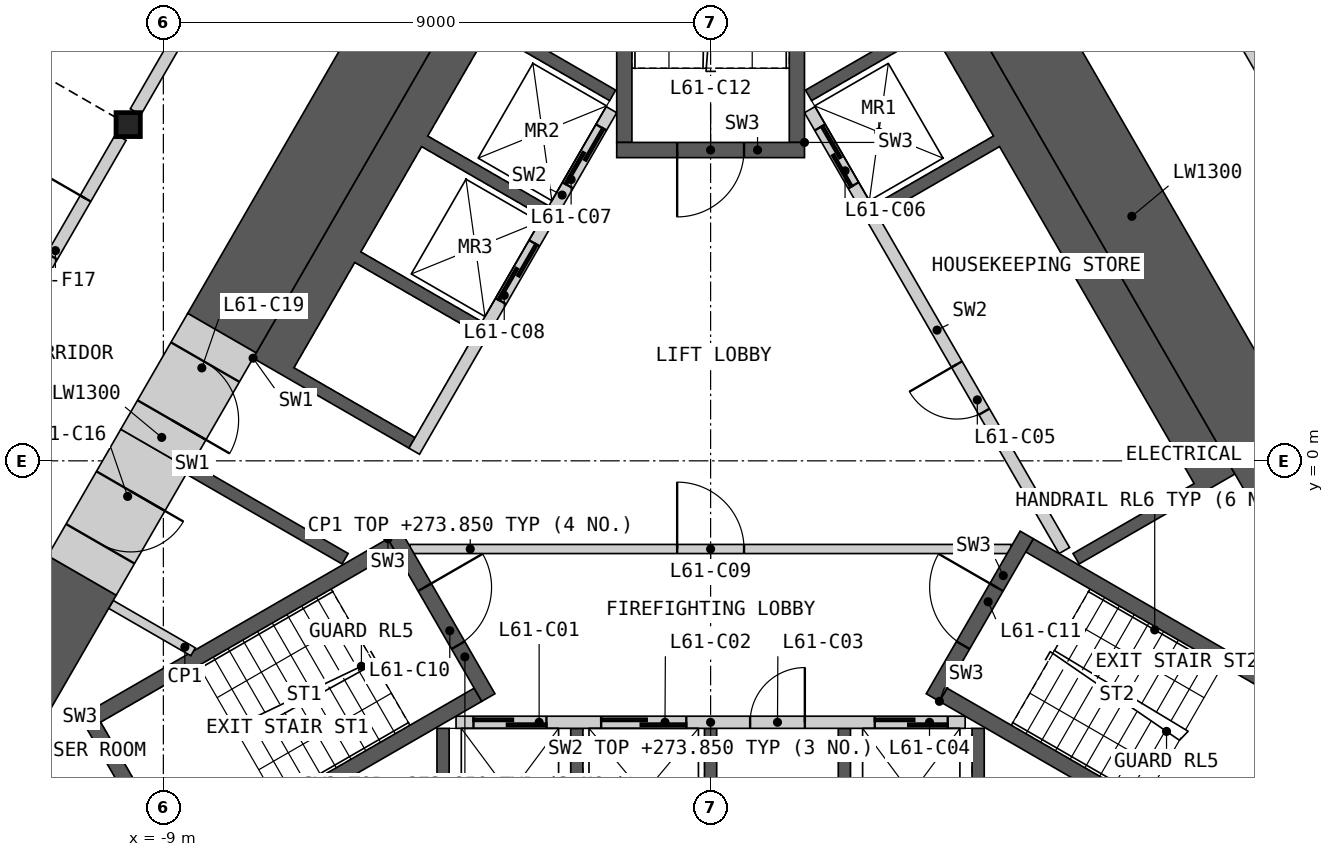
"""IFC4 building model, lengths in metres.
Left out: names, types, materials, properties, quantities, classifications, styles, units other than length and angle.
Written with IfcOpenShell. Run it as: python <this file> out.ifc"""

import sys

from ifc_helpers import new_model, si_unit, direction, frame, frame_2d, origin, origin_2d, place, context, subcontext, project, spatial, polyline, rectangle, i_section, outline, extrude, element, fill, save


model = new_model("IFC4")
c1 = context("Model", 3, precision=1e-05, world=origin(), true_north=direction((0.0, 1.0)))
c2 = subcontext(c1, "Body", "Model", "MODEL_VIEW")
j1 = project(units=[si_unit("LENGTHUNIT", "METRE"), si_unit("PLANEANGLEUNIT", "RADIAN")], contexts=[c1])
p1 = place(None, origin())
s1 = spatial("IfcSite", under=j1, at=p1, CompositionType="ELEMENT")
p2 = place(p1, origin())
s2 = spatial("IfcBuilding", under=s1, at=p2, CompositionType="ELEMENT")
p3 = place(p2, frame((0.0, 0.0, 270.6)))
s3 = spatial("IfcBuildingStorey", under=s2, at=p3, CompositionType="ELEMENT", Elevation=270.6)
p4 = place(p3, frame((-9.578, 5.53, 0.0), z_axis=(0.0, 0.0, 1.0), x_axis=(1.0, 0.0, 0.0)))
e1 = element("IfcColumn", 1, at=p4, inside=s3, PredefinedType="COLUMN", context=c2, shape_type="SweptSolid", body=[
    extrude(i_section(OverallWidth=0.399, OverallDepth=0.393, WebThickness=0.023, FlangeThickness=0.037, at=origin_2d()), origin(), (0.0, 0.0, 1.0), 3.6),
])
p5 = place(p3, origin())
e2 = element("IfcWall", 2, at=p5, inside=s3, PredefinedType="SHEAR", context=c2, shape_type="SweptSolid", body=[
    extrude(outline(polyline([(0.1, -7.36), (-4.5, -7.36), (-4.5, -4.4), (-4.3, -4.4), (-4.3, -6.7), (-2.3, -6.7), (-2.3, -4.4), (-2.1, -4.4), (-2.1, -6.7), (-0.1, -6.7), (-0.1, -4.4), (0.1, -4.4), (0.1, -7.36)])), origin(), (0.0, 0.0, 1.0), 3.25),
])
p6 = place(p3, origin())
e3 = element("IfcWall", 3, at=p6, inside=s3, PredefinedType="SHEAR", context=c2, shape_type="SweptSolid", body=[
    extrude(outline(polyline([(2.1, -7.36), (2.1, -4.4), (2.3, -4.4), (2.3, -6.7), (4.3, -6.7), (4.3, -4.4), (4.5, -4.4), (4.5, -7.36), (2.1, -7.36)])), origin(), (0.0, 0.0, 1.0), 3.25),
])
p7 = place(p3, frame((-4.187, -4.3, 0.0), z_axis=(0.0, 0.0, 1.0), x_axis=(1.0, 0.0, 0.0)))
e4 = element("IfcWall", 4, at=p7, inside=s3, PredefinedType="SOLIDWALL", context=c2, shape_type="SweptSolid", body=[
    extrude(rectangle(XDim=8.373, YDim=0.2, at=frame_2d((4.187, 0.0))), origin(), (0.0, 0.0, 1.0), 3.25),
])
p8 = place(p7, frame((0.287, 0.0, 0.0)))
e5 = element("IfcOpeningElement", 5, at=p8, cuts=e4, PredefinedType="OPENING", context=c2, shape_type="SweptSolid", body=[
    extrude(rectangle(XDim=1.2, YDim=2.1, at=frame_2d((0.6, 1.05))), frame((0.0, 0.11, 0.0), z_axis=(0.0, -1.0, 0.0), x_axis=(1.0, 0.0, 0.0)), (0.0, 0.0, 1.0), 0.22),
])
p9 = place(p7, frame((2.387, 0.0, 0.0)))
e6 = element("IfcOpeningElement", 6, at=p9, cuts=e4, PredefinedType="OPENING", context=c2, shape_type="SweptSolid", body=[
    extrude(rectangle(XDim=1.4, YDim=2.1, at=frame_2d((0.7, 1.05))), frame((0.0, 0.11, 0.0), z_axis=(0.0, -1.0, 0.0), x_axis=(1.0, 0.0, 0.0)), (0.0, 0.0, 1.0), 0.22),
])
p10 = place(p7, frame((4.837, 0.0, 0.0)))
e7 = element("IfcOpeningElement", 7, at=p10, cuts=e4, PredefinedType="OPENING", context=c2, shape_type="SweptSolid", body=[
    extrude(rectangle(XDim=0.9, YDim=2.1, at=frame_2d((0.45, 1.05))), frame((0.0, 0.11, 0.0), z_axis=(0.0, -1.0, 0.0), x_axis=(1.0, 0.0, 0.0)), (0.0, 0.0, 1.0), 0.22),
])
p11 = place(p7, frame((6.887, 0.0, 0.0)))
e8 = element("IfcOpeningElement", 8, at=p11, cuts=e4, PredefinedType="OPENING", context=c2, shape_type="SweptSolid", body=[
    extrude(rectangle(XDim=1.2, YDim=2.1, at=frame_2d((0.6, 1.05))), frame((0.0, 0.11, 0.0), z_axis=(0.0, -1.0, 0.0), x_axis=(1.0, 0.0, 0.0)), (0.0, 0.0, 1.0), 0.22),
])
p12 = place(p3, origin())
e9 = element("IfcWall", 9, at=p12, inside=s3, PredefinedType="SHEAR", context=c2, shape_type="SweptSolid", body=[
    extrude(outline(polyline([(4.124, 7.577), (8.624, -0.217), (8.231, -0.444), (6.061, -1.697), (5.96, -1.524), (7.952, -0.374), (4.752, 5.169), (2.76, 4.019), (2.66, 4.192), (4.652, 5.342), (3.652, 7.074), (1.66, 5.924), (1.561, 6.097), (3.731, 7.35), (4.124, 7.577)])), origin(), (0.0, 0.0, 1.0), 3.25),
])
p13 = place(p3, frame((5.817, -1.476, 0.0), z_axis=(0.0, 0.0, 1.0), x_axis=(-0.500002616675, 0.866023893041, 0.0)))
e10 = element("IfcWall", 10, at=p13, inside=s3, PredefinedType="SOLIDWALL", context=c2, shape_type="SweptSolid", body=[
    extrude(rectangle(XDim=8.373, YDim=0.2, at=frame_2d((4.187, 0.0))), origin(), (0.0, 0.0, 1.0), 3.25),
])
p14 = place(p13, frame((2.637, 0.0, 0.0)))
e11 = element("IfcOpeningElement", 11, at=p14, cuts=e10, PredefinedType="OPENING", context=c2, shape_type="SweptSolid", body=[
    extrude(rectangle(XDim=0.9, YDim=2.1, at=frame_2d((0.45, 1.05))), frame((0.0, 0.11, 0.0), z_axis=(0.0, -1.0, 0.0), x_axis=(1.0, 0.0, 0.0)), (0.0, 0.0, 1.0), 0.22),
])
p15 = place(p13, frame((6.937, 0.0, 0.0)))
e12 = element("IfcOpeningElement", 12, at=p15, cuts=e10, PredefinedType="OPENING", context=c2, shape_type="SweptSolid", body=[
    extrude(rectangle(XDim=1.1, YDim=2.1, at=frame_2d((0.55, 1.05))), frame((0.0, 0.11, 0.0), z_axis=(0.0, -1.0, 0.0), x_axis=(1.0, 0.0, 0.0)), (0.0, 0.0, 1.0), 0.22),
])
p16 = place(p3, origin())
e13 = element("IfcWall", 13, at=p16, inside=s3, PredefinedType="SHEAR", context=c2, shape_type="SweptSolid", body=[
    extrude(outline(polyline([(-7.524, 1.688), (-4.124, 7.577), (-3.731, 7.35), (-1.561, 6.097), (-1.66, 5.924), (-3.652, 7.074), (-4.652, 5.342), (-2.66, 4.192), (-2.76, 4.019), (-4.752, 5.169), (-5.752, 3.437), (-3.76, 2.287), (-3.861, 2.113), (-5.852, 3.263), (-6.852, 1.531), (-4.861, 0.381), (-4.96, 0.208), (-7.131, 1.461), (-7.524, 1.688)])), origin(), (0.0, 0.0, 1.0), 3.25),
])
p17 = place(p3, origin())
e14 = element("IfcWall", 14, at=p17, inside=s3, PredefinedType="SHEAR", context=c2, shape_type="SweptSolid", body=[
    extrude(outline(polyline([(-8.524, -0.044), (-8.131, -0.271), (-5.96, -1.524), (-6.061, -1.697), (-8.231, -0.444), (-8.624, -0.217), (-8.524, -0.044)])), origin(), (0.0, 0.0, 1.0), 3.25),
])
p18 = place(p3, frame((-1.631, 5.776, 0.0), z_axis=(0.0, 0.0, 1.0), x_axis=(-0.499992876559, -0.866029516466, 0.0)))
e15 = element("IfcWall", 15, at=p18, inside=s3, PredefinedType="SOLIDWALL", context=c2, shape_type="SweptSolid", body=[
    extrude(rectangle(XDim=6.486, YDim=0.2, at=frame_2d((3.243, 0.0))), origin(), (0.0, 0.0, 1.0), 3.25),
])
p19 = place(p18, frame((0.337, 0.0, 0.0)))
e16 = element("IfcOpeningElement", 16, at=p19, cuts=e15, PredefinedType="OPENING", context=c2, shape_type="SweptSolid", body=[
    extrude(rectangle(XDim=1.1, YDim=2.1, at=frame_2d((0.55, 1.05))), frame((0.0, 0.11, 0.0), z_axis=(0.0, -1.0, 0.0), x_axis=(1.0, 0.0, 0.0)), (0.0, 0.0, 1.0), 0.22),
])
p20 = place(p18, frame((2.537, 0.0, 0.0)))
e17 = element("IfcOpeningElement", 17, at=p20, cuts=e15, PredefinedType="OPENING", context=c2, shape_type="SweptSolid", body=[
    extrude(rectangle(XDim=1.1, YDim=2.1, at=frame_2d((0.55, 1.05))), frame((0.0, 0.11, 0.0), z_axis=(0.0, -1.0, 0.0), x_axis=(1.0, 0.0, 0.0)), (0.0, 0.0, 1.0), 0.22),
])
p21 = place(p3, frame((-4.941, -1.45, 0.0), z_axis=(0.0, 0.0, 1.0), x_axis=(1.0, 0.0, 0.0)))
e18 = element("IfcWall", 18, at=p21, inside=s3, PredefinedType="PARTITIONING", context=c2, shape_type="SweptSolid", body=[
    extrude(rectangle(XDim=9.882, YDim=0.15, at=frame_2d((4.941, 0.0))), origin(), (0.0, 0.0, 1.0), 3.25),
])
p22 = place(p21, frame((4.391, 0.0, 0.0)))
e19 = element("IfcOpeningElement", 19, at=p22, cuts=e18, PredefinedType="OPENING", context=c2, shape_type="SweptSolid", body=[
    extrude(rectangle(XDim=1.1, YDim=2.1, at=frame_2d((0.55, 1.05))), frame((0.0, 0.085, 0.0), z_axis=(0.0, -1.0, 0.0), x_axis=(1.0, 0.0, 0.0)), (0.0, 0.0, 1.0), 0.17),
])
p23 = place(p3, origin())
e20 = element("IfcWall", 20, at=p23, inside=s3, PredefinedType="SHEAR", context=c2, shape_type="SweptSolid", body=[
    extrude(outline(polyline([(-5.307, -1.281), (-10.374, -4.206), (-10.032, -4.298), (-5.182, -1.498), (-5.307, -1.281)])), origin(), (0.0, 0.0, 1.0), 3.25),
])
p24 = place(p3, origin())
e21 = element("IfcWall", 21, at=p24, inside=s3, PredefinedType="SHEAR", context=c2, shape_type="SweptSolid", body=[
    extrude(outline(polyline([(-10.374, -4.206), (-8.83, -6.881), (-8.738, -6.539), (-10.032, -4.298), (-10.374, -4.206)])), origin(), (0.0, 0.0, 1.0), 3.25),
])
p25 = place(p3, origin())
e22 = element("IfcWall", 22, at=p25, inside=s3, PredefinedType="SHEAR", context=c2, shape_type="SweptSolid", body=[
    extrude(outline(polyline([(-8.738, -6.539), (-8.83, -6.881), (-3.763, -3.956), (-3.888, -3.739), (-8.738, -6.539)])), origin(), (0.0, 0.0, 1.0), 3.25),
])
p26 = place(p3, frame((-5.199, -1.219, 0.0), z_axis=(0.0, 0.0, 1.0), x_axis=(0.499982516597, -0.866035497597, 0.0)))
e23 = element("IfcWall", 23, at=p26, inside=s3, PredefinedType="SHEAR", context=c2, shape_type="SweptSolid", body=[
    extrude(rectangle(XDim=3.088, YDim=0.25, at=frame_2d((1.544, 0.0))), origin(), (0.0, 0.0, 1.0), 3.25),
])
p27 = place(p26, frame((0.994, 0.0, 0.0)))
e24 = element("IfcOpeningElement", 24, at=p27, cuts=e23, PredefinedType="OPENING", context=c2, shape_type="SweptSolid", body=[
    extrude(rectangle(XDim=1.1, YDim=2.1, at=frame_2d((0.55, 1.05))), frame((0.0, 0.135, 0.0), z_axis=(0.0, -1.0, 0.0), x_axis=(1.0, 0.0, 0.0)), (0.0, 0.0, 1.0), 0.27),
])
p28 = place(p3, origin())
e25 = element("IfcWall", 25, at=p28, inside=s3, PredefinedType="SHEAR", context=c2, shape_type="SweptSolid", body=[
    extrude(outline(polyline([(3.763, -3.956), (8.83, -6.881), (8.738, -6.539), (3.888, -3.739), (3.763, -3.956)])), origin(), (0.0, 0.0, 1.0), 3.25),
])
p29 = place(p3, origin())
e26 = element("IfcWall", 26, at=p29, inside=s3, PredefinedType="SHEAR", context=c2, shape_type="SweptSolid", body=[
    extrude(outline(polyline([(8.83, -6.881), (10.374, -4.206), (10.032, -4.298), (8.738, -6.539), (8.83, -6.881)])), origin(), (0.0, 0.0, 1.0), 3.25),
])
p30 = place(p3, origin())
e27 = element("IfcWall", 27, at=p30, inside=s3, PredefinedType="SHEAR", context=c2, shape_type="SweptSolid", body=[
    extrude(outline(polyline([(10.032, -4.298), (10.374, -4.206), (5.307, -1.281), (5.182, -1.498), (10.032, -4.298)])), origin(), (0.0, 0.0, 1.0), 3.25),
])
p31 = place(p3, frame((3.655, -3.893, 0.0), z_axis=(0.0, 0.0, 1.0), x_axis=(0.499982516597, 0.866035497597, 0.0)))
e28 = element("IfcWall", 28, at=p31, inside=s3, PredefinedType="SHEAR", context=c2, shape_type="SweptSolid", body=[
    extrude(rectangle(XDim=3.088, YDim=0.25, at=frame_2d((1.544, 0.0))), origin(), (0.0, 0.0, 1.0), 3.25),
])
p32 = place(p31, frame((0.994, 0.0, 0.0)))
e29 = element("IfcOpeningElement", 29, at=p32, cuts=e28, PredefinedType="OPENING", context=c2, shape_type="SweptSolid", body=[
    extrude(rectangle(XDim=1.1, YDim=2.1, at=frame_2d((0.55, 1.05))), frame((0.0, 0.135, 0.0), z_axis=(0.0, -1.0, 0.0), x_axis=(1.0, 0.0, 0.0)), (0.0, 0.0, 1.0), 0.27),
])
p33 = place(p3, origin())
e30 = element("IfcWall", 30, at=p33, inside=s3, PredefinedType="SHEAR", context=c2, shape_type="SweptSolid", body=[
    extrude(outline(polyline([(1.544, 5.237), (1.544, 11.087), (1.294, 10.837), (1.294, 5.237), (1.544, 5.237)])), origin(), (0.0, 0.0, 1.0), 3.25),
])
p34 = place(p3, origin())
e31 = element("IfcWall", 31, at=p34, inside=s3, PredefinedType="SHEAR", context=c2, shape_type="SweptSolid", body=[
    extrude(outline(polyline([(-1.294, 10.837), (-1.544, 11.087), (-1.544, 5.237), (-1.294, 5.237), (-1.294, 10.837)])), origin(), (0.0, 0.0, 1.0), 3.25),
])
p35 = place(p3, frame((1.544, 5.112, 0.0), z_axis=(0.0, 0.0, 1.0), x_axis=(-1.0, 0.0, 0.0)))
e32 = element("IfcWall", 32, at=p35, inside=s3, PredefinedType="SHEAR", context=c2, shape_type="SweptSolid", body=[
    extrude(rectangle(XDim=3.088, YDim=0.25, at=frame_2d((1.544, 0.0))), origin(), (0.0, 0.0, 1.0), 3.25),
])
p36 = place(p35, frame((0.994, 0.0, 0.0)))
e33 = element("IfcOpeningElement", 33, at=p36, cuts=e32, PredefinedType="OPENING", context=c2, shape_type="SweptSolid", body=[
    extrude(rectangle(XDim=1.1, YDim=2.1, at=frame_2d((0.55, 1.05))), frame((0.0, 0.135, 0.0), z_axis=(0.0, -1.0, 0.0), x_axis=(1.0, 0.0, 0.0)), (0.0, 0.0, 1.0), 0.27),
])
p37 = place(p3, frame((11.511, -5.218, 0.0), z_axis=(0.0, 0.0, 1.0), x_axis=(-0.866045649925, -0.499964931016, 0.0)))
e34 = element("IfcWall", 34, at=p37, inside=s3, PredefinedType="PARTITIONING", context=c2, shape_type="SweptSolid", body=[
    extrude(rectangle(XDim=2.992, YDim=0.15, at=frame_2d((1.496, 0.0))), origin(), (0.0, 0.0, 1.0), 3.25),
])
p38 = place(p3, frame((-9.862, -2.361, 0.0), z_axis=(0.0, 0.0, 1.0), x_axis=(0.865990094875, -0.500061151839, 0.0)))
e35 = element("IfcWall", 35, at=p38, inside=s3, PredefinedType="PARTITIONING", context=c2, shape_type="SweptSolid", body=[
    extrude(rectangle(XDim=1.56, YDim=0.15, at=frame_2d((0.78, 0.0))), origin(), (0.0, 0.0, 1.0), 3.25),
])
p39 = place(p3, frame((10.062, -1.408, 0.0), z_axis=(0.0, 0.0, 1.0), x_axis=(-0.500000545805, 0.866025088663, 0.0)))
e36 = element("IfcWall", 36, at=p39, inside=s3, PredefinedType="SHEAR", context=c2, shape_type="SweptSolid", body=[
    extrude(rectangle(XDim=12.539, YDim=1.3, at=frame_2d((6.27, 0.0))), origin(), (0.0, 0.0, 1.0), 3.25),
])
p40 = place(p3, frame((-3.812, 9.418, 0.0), z_axis=(0.0, 0.0, 1.0), x_axis=(-0.499995037753, -0.86602826872, 0.0)))
e37 = element("IfcWall", 37, at=p40, inside=s3, PredefinedType="SHEAR", context=c2, shape_type="SweptSolid", body=[
    extrude(rectangle(XDim=8.451, YDim=1.3, at=frame_2d((4.225, 0.0))), origin(), (0.0, 0.0, 1.0), 3.25),
])
p41 = place(p3, frame((-10.338, -1.885, 0.0), z_axis=(0.0, 0.0, 1.0), x_axis=(-0.499975944838, -0.866039291593, 0.0)))
e38 = element("IfcWall", 38, at=p41, inside=s3, PredefinedType="SHEAR", context=c2, shape_type="SweptSolid", body=[
    extrude(rectangle(XDim=5.947, YDim=1.3, at=frame_2d((2.974, 0.0))), origin(), (0.0, 0.0, 1.0), 3.25),
])
p42 = place(p3, frame((-9.137, 0.195, 0.0), z_axis=(0.0, 0.0, 1.0), x_axis=(-0.500009943768, -0.866019662671, 0.0)))
e39 = element("IfcWall", 39, at=p42, inside=s3, PredefinedType="SHEAR", context=c2, shape_type="SweptSolid", body=[
    extrude(rectangle(XDim=2.401, YDim=1.3, at=frame_2d((1.201, 0.0))), origin(), (0.0, 0.0, 1.0), 3.25),
])
p43 = place(p42, frame((0.8, 0.0, 0.0)))
e40 = element("IfcOpeningElement", 40, at=p43, cuts=e39, PredefinedType="OPENING", context=c2, shape_type="SweptSolid", body=[
    extrude(rectangle(XDim=1.0, YDim=2.1, at=frame_2d((0.5, 1.05))), frame((0.0, 0.66, 0.0), z_axis=(0.0, -1.0, 0.0), x_axis=(1.0, 0.0, 0.0)), (0.0, 0.0, 1.0), 1.32),
])
p44 = place(p3, frame((-8.037, 2.1, 0.0), z_axis=(0.0, 0.0, 1.0), x_axis=(-0.50002983664, -0.866008176907, 0.0)))
e41 = element("IfcWall", 41, at=p44, inside=s3, PredefinedType="SHEAR", context=c2, shape_type="SweptSolid", body=[
    extrude(rectangle(XDim=2.2, YDim=1.3, at=frame_2d((1.1, 0.0))), origin(), (0.0, 0.0, 1.0), 3.25),
])
p45 = place(p44, frame((0.55, 0.0, 0.0)))
e42 = element("IfcOpeningElement", 42, at=p45, cuts=e41, PredefinedType="OPENING", context=c2, shape_type="SweptSolid", body=[
    extrude(rectangle(XDim=1.1, YDim=2.1, at=frame_2d((0.55, 1.05))), frame((0.0, 0.66, 0.0), z_axis=(0.0, -1.0, 0.0), x_axis=(1.0, 0.0, 0.0)), (0.0, 0.0, 1.0), 1.32),
])
p46 = place(p3, frame((-14.247, -2.556, 0.0), z_axis=(0.0, 0.0, 1.0), x_axis=(0.49998193945, 0.866035830797, 0.0)))
e43 = element("IfcWall", 43, at=p46, inside=s3, PredefinedType="PARTITIONING", context=c2, shape_type="SweptSolid", body=[
    extrude(rectangle(XDim=9.094, YDim=0.2, at=frame_2d((4.547, 0.0))), origin(), (0.0, 0.0, 1.0), 3.25),
])
p47 = place(p46, frame((6.833, 0.0, 0.0)))
e44 = element("IfcOpeningElement", 44, at=p47, cuts=e43, PredefinedType="OPENING", context=c2, shape_type="SweptSolid", body=[
    extrude(rectangle(XDim=1.1, YDim=2.1, at=frame_2d((0.55, 1.05))), frame((0.0, 0.11, 0.0), z_axis=(0.0, -1.0, 0.0), x_axis=(1.0, 0.0, 0.0)), (0.0, 0.0, 1.0), 0.22),
])
for number, where, z_axis, x_axis in (
    (45, (4.91, 13.616, 0.0), (0.0, 0.0, 1.0), (0.5, -0.866, 0.0)),
    (46, (-9.458, 5.74, 0.0), (0.0, 0.0, 1.0), (0.5, 0.866, 0.0)),
):
    element("IfcWall", number, at=place(p3, frame(where, z_axis=z_axis, x_axis=x_axis)), inside=s3, PredefinedType="PARTITIONING", context=c2, shape_type="SweptSolid", body=[
        extrude(rectangle(XDim=9.095, YDim=0.2, at=frame_2d((4.547, 0.0))), origin(), (0.0, 0.0, 1.0), 3.25),
    ])
p48 = place(p8, origin())
e47 = element("IfcDoor", 47, at=p48, inside=s3, OperationType="SLIDING_TO_LEFT", PredefinedType="DOOR", context=c2, shape_type="SweptSolid", body=[
    extrude(rectangle(XDim=1.2, YDim=2.1, at=frame_2d((0.6, 1.05))), frame((0.0, 0.025, 0.0), z_axis=(0.0, -1.0, 0.0), x_axis=(1.0, 0.0, 0.0)), (0.0, 0.0, 1.0), 0.05),
])
fill(e5, e47)
p49 = place(p9, origin())
e48 = element("IfcDoor", 48, at=p49, inside=s3, OperationType="SLIDING_TO_LEFT", PredefinedType="DOOR", context=c2, shape_type="SweptSolid", body=[
    extrude(rectangle(XDim=1.4, YDim=2.1, at=frame_2d((0.7, 1.05))), frame((0.0, 0.025, 0.0), z_axis=(0.0, -1.0, 0.0), x_axis=(1.0, 0.0, 0.0)), (0.0, 0.0, 1.0), 0.05),
])
fill(e6, e48)
p50 = place(p10, origin())
e49 = element("IfcDoor", 49, at=p50, inside=s3, OperationType="SINGLE_SWING_RIGHT", PredefinedType="DOOR", context=c2, shape_type="SweptSolid", body=[
    extrude(rectangle(XDim=0.9, YDim=2.1, at=frame_2d((0.45, 1.05))), frame((0.0, 0.025, 0.0), z_axis=(0.0, -1.0, 0.0), x_axis=(1.0, 0.0, 0.0)), (0.0, 0.0, 1.0), 0.05),
])
fill(e7, e49)
p51 = place(p11, origin())
e50 = element("IfcDoor", 50, at=p51, inside=s3, OperationType="SLIDING_TO_LEFT", PredefinedType="DOOR", context=c2, shape_type="SweptSolid", body=[
    extrude(rectangle(XDim=1.2, YDim=2.1, at=frame_2d((0.6, 1.05))), frame((0.0, 0.025, 0.0), z_axis=(0.0, -1.0, 0.0), x_axis=(1.0, 0.0, 0.0)), (0.0, 0.0, 1.0), 0.05),
])
fill(e8, e50)
p52 = place(p14, origin())
e51 = element("IfcDoor", 51, at=p52, inside=s3, OperationType="SINGLE_SWING_RIGHT", PredefinedType="DOOR", context=c2, shape_type="SweptSolid", body=[
    extrude(rectangle(XDim=0.9, YDim=2.1, at=frame_2d((0.45, 1.05))), frame((0.0, 0.025, 0.0), z_axis=(0.0, -1.0, 0.0), x_axis=(1.0, 0.0, 0.0)), (0.0, 0.0, 1.0), 0.05),
])
fill(e11, e51)
p53 = place(p15, origin())
e52 = element("IfcDoor", 52, at=p53, inside=s3, OperationType="SLIDING_TO_LEFT", PredefinedType="DOOR", context=c2, shape_type="SweptSolid", body=[
    extrude(rectangle(XDim=1.1, YDim=2.1, at=frame_2d((0.55, 1.05))), frame((0.0, 0.025, 0.0), z_axis=(0.0, -1.0, 0.0), x_axis=(1.0, 0.0, 0.0)), (0.0, 0.0, 1.0), 0.05),
])
fill(e12, e52)
p54 = place(p19, origin())
e53 = element("IfcDoor", 53, at=p54, inside=s3, OperationType="SLIDING_TO_LEFT", PredefinedType="DOOR", context=c2, shape_type="SweptSolid", body=[
    extrude(rectangle(XDim=1.1, YDim=2.1, at=frame_2d((0.55, 1.05))), frame((0.0, 0.025, 0.0), z_axis=(0.0, -1.0, 0.0), x_axis=(1.0, 0.0, 0.0)), (0.0, 0.0, 1.0), 0.05),
])
fill(e16, e53)
p55 = place(p20, origin())
e54 = element("IfcDoor", 54, at=p55, inside=s3, OperationType="SLIDING_TO_LEFT", PredefinedType="DOOR", context=c2, shape_type="SweptSolid", body=[
    extrude(rectangle(XDim=1.1, YDim=2.1, at=frame_2d((0.55, 1.05))), frame((0.0, 0.025, 0.0), z_axis=(0.0, -1.0, 0.0), x_axis=(1.0, 0.0, 0.0)), (0.0, 0.0, 1.0), 0.05),
])
fill(e17, e54)
p56 = place(p22, origin())
e55 = element("IfcDoor", 55, at=p56, inside=s3, OperationType="SINGLE_SWING_LEFT", PredefinedType="DOOR", context=c2, shape_type="SweptSolid", body=[
    extrude(rectangle(XDim=1.1, YDim=2.1, at=frame_2d((0.55, 1.05))), frame((0.0, 0.025, 0.0), z_axis=(0.0, -1.0, 0.0), x_axis=(1.0, 0.0, 0.0)), (0.0, 0.0, 1.0), 0.05),
])
fill(e19, e55)
p57 = place(p27, origin())
e56 = element("IfcDoor", 56, at=p57, inside=s3, OperationType="SINGLE_SWING_LEFT", PredefinedType="DOOR", context=c2, shape_type="SweptSolid", body=[
    extrude(rectangle(XDim=1.1, YDim=2.1, at=frame_2d((0.55, 1.05))), frame((0.0, 0.025, 0.0), z_axis=(0.0, -1.0, 0.0), x_axis=(1.0, 0.0, 0.0)), (0.0, 0.0, 1.0), 0.05),
])
fill(e24, e56)
p58 = place(p32, origin())
e57 = element("IfcDoor", 57, at=p58, inside=s3, OperationType="SINGLE_SWING_RIGHT", PredefinedType="DOOR", context=c2, shape_type="SweptSolid", body=[
    extrude(rectangle(XDim=1.1, YDim=2.1, at=frame_2d((0.55, 1.05))), frame((0.0, 0.025, 0.0), z_axis=(0.0, -1.0, 0.0), x_axis=(1.0, 0.0, 0.0)), (0.0, 0.0, 1.0), 0.05),
])
fill(e29, e57)
p59 = place(p36, origin())
e58 = element("IfcDoor", 58, at=p59, inside=s3, OperationType="SINGLE_SWING_RIGHT", PredefinedType="DOOR", context=c2, shape_type="SweptSolid", body=[
    extrude(rectangle(XDim=1.1, YDim=2.1, at=frame_2d((0.55, 1.05))), frame((0.0, 0.025, 0.0), z_axis=(0.0, -1.0, 0.0), x_axis=(1.0, 0.0, 0.0)), (0.0, 0.0, 1.0), 0.05),
])
fill(e33, e58)
p60 = place(p43, origin())
e59 = element("IfcDoor", 59, at=p60, inside=s3, OperationType="SINGLE_SWING_LEFT", PredefinedType="DOOR", context=c2, shape_type="SweptSolid", body=[
    extrude(rectangle(XDim=1.0, YDim=2.1, at=frame_2d((0.5, 1.05))), frame((0.0, 0.405, 0.0), z_axis=(0.0, -1.0, 0.0), x_axis=(1.0, 0.0, 0.0)), (0.0, 0.0, 1.0), 0.05),
])
fill(e40, e59)
p61 = place(p45, origin())
e60 = element("IfcDoor", 60, at=p61, inside=s3, OperationType="SINGLE_SWING_RIGHT", PredefinedType="DOOR", context=c2, shape_type="SweptSolid", body=[
    extrude(rectangle(XDim=1.1, YDim=2.1, at=frame_2d((0.55, 1.05))), frame((0.0, 0.405, 0.0), z_axis=(0.0, -1.0, 0.0), x_axis=(1.0, 0.0, 0.0)), (0.0, 0.0, 1.0), 0.05),
])
fill(e42, e60)
p62 = place(p47, origin())
e61 = element("IfcDoor", 61, at=p62, inside=s3, OperationType="SINGLE_SWING_RIGHT", PredefinedType="DOOR", context=c2, shape_type="SweptSolid", body=[
    extrude(rectangle(XDim=1.1, YDim=2.1, at=frame_2d((0.55, 1.05))), frame((0.0, 0.025, 0.0), z_axis=(0.0, -1.0, 0.0), x_axis=(1.0, 0.0, 0.0)), (0.0, 0.0, 1.0), 0.05),
])
fill(e44, e61)
save(model, sys.argv[1])
